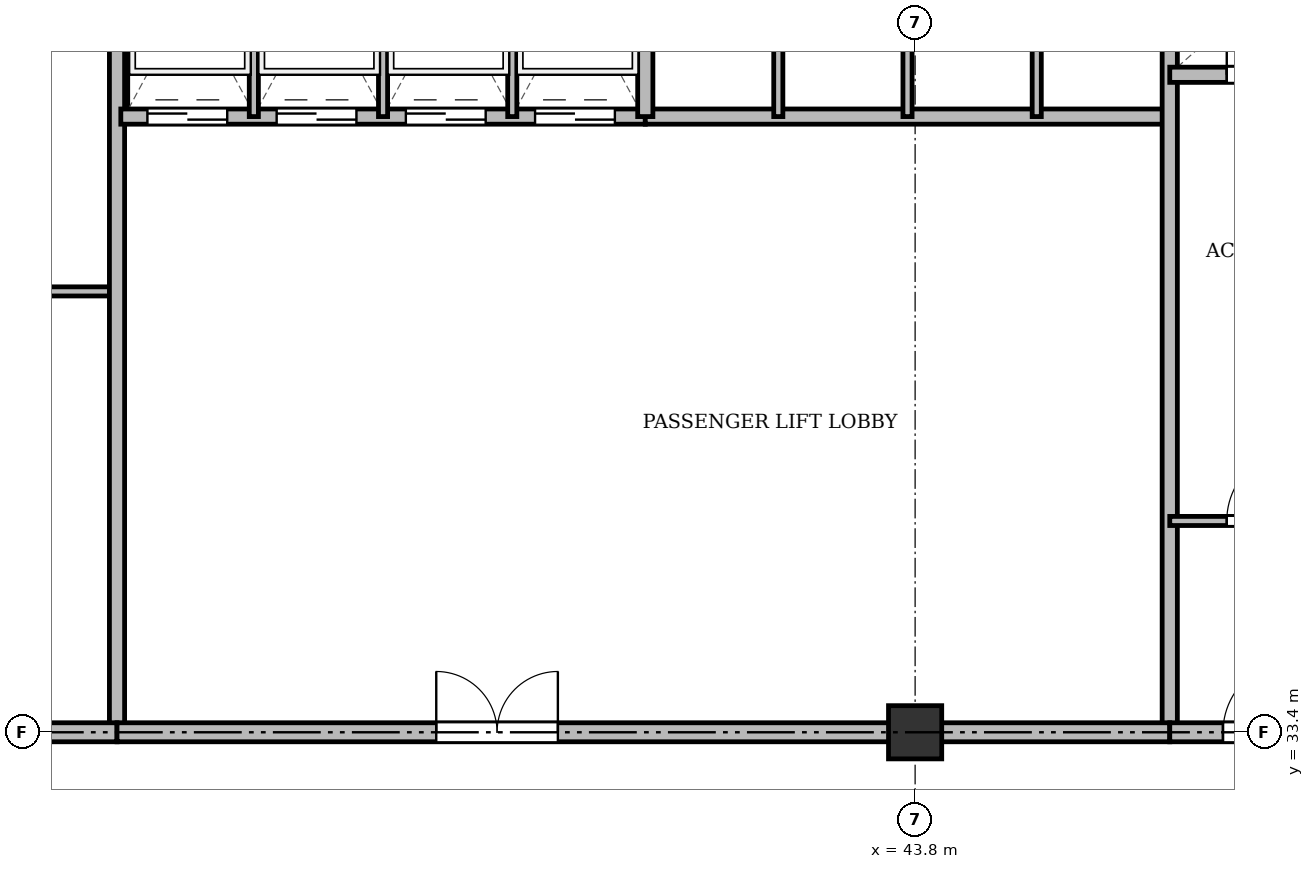
"""IFC4 building model, lengths in metres.
Left out: names, types, materials, properties, quantities, classifications, styles, units other than length and angle.
Written with IfcOpenShell. Run it as: python <this file> out.ifc"""

import sys

from ifc_helpers import new_model, si_unit, direction, frame, frame_2d, origin, origin_2d, place, context, subcontext, project, spatial, rectangle, extrude, source, transform, mapped, element, fill, save


model = new_model("IFC4")
c1 = context("Model", 3, precision=1e-05, world=origin(), true_north=direction((0.0, 1.0)))
c2 = subcontext(c1, "Body", "Model", "MODEL_VIEW")
j1 = project(units=[si_unit("LENGTHUNIT", "METRE"), si_unit("PLANEANGLEUNIT", "RADIAN")], contexts=[c1])
p1 = place(None, origin())
s1 = spatial("IfcSite", under=j1, at=p1, CompositionType="ELEMENT")
p2 = place(p1, origin())
s2 = spatial("IfcBuilding", under=s1, at=p2, CompositionType="ELEMENT")
p3 = place(p2, frame((0.0, 0.0, 204.9)))
s3 = spatial("IfcBuildingStorey", under=s2, at=p3, CompositionType="ELEMENT", Elevation=204.9)
m1 = source(origin(), c2, "Body", "SweptSolid", [
    extrude(rectangle(XDim=0.7, YDim=0.7, at=origin_2d()), origin(), (0.0, 0.0, 1.0), 3.6),
])
p4 = place(p3, frame((43.8, 33.4, 0.0), z_axis=(0.0, 0.0, 1.0), x_axis=(1.0, 0.0, 0.0)))
e1 = element("IfcColumn", 1, at=p4, inside=s3, PredefinedType="COLUMN", context=c2, shape_type="MappedRepresentation", body=[
    mapped(m1, transform((0.0, 0.0, 0.0), x_axis=(1.0, 0.0, 0.0), y_axis=(0.0, 1.0, 0.0), z_axis=(0.0, 0.0, 1.0), scale=1.0)),
])
p5 = place(p3, frame((26.3, 39.2, 0.0), z_axis=(0.0, 0.0, 1.0), x_axis=(1.0, 0.0, 0.0)))
e2 = element("IfcWall", 2, at=p5, inside=s3, PredefinedType="PARTITIONING", context=c2, shape_type="SweptSolid", body=[
    extrude(rectangle(XDim=7.0, YDim=0.12, at=frame_2d((3.5, 0.0))), origin(), (0.0, 0.0, 1.0), 2.86),
])
p6 = place(p5, frame((2.6, 0.0, 0.0)))
e3 = element("IfcOpeningElement", 3, at=p6, cuts=e2, PredefinedType="OPENING", context=c2, shape_type="SweptSolid", body=[
    extrude(rectangle(XDim=0.95, YDim=2.15, at=frame_2d((0.475, 1.075))), frame((0.0, 0.07, 0.0), z_axis=(0.0, -1.0, 0.0), x_axis=(1.0, 0.0, 0.0)), (0.0, 0.0, 1.0), 0.14),
])
p7 = place(p3, frame((33.3, 33.4, 0.0), z_axis=(0.0, 0.0, 1.0), x_axis=(0.0, 1.0, 0.0)))
e4 = element("IfcWall", 4, at=p7, inside=s3, PredefinedType="SOLIDWALL", context=c2, shape_type="SweptSolid", body=[
    extrude(rectangle(XDim=11.3, YDim=0.2, at=frame_2d((5.65, 0.0))), origin(), (0.0, 0.0, 1.0), 2.91),
])
p8 = place(p3, frame((33.35, 41.5, 0.0), z_axis=(0.0, 0.0, 1.0), x_axis=(1.0, 0.0, 0.0)))
e5 = element("IfcWall", 5, at=p8, inside=s3, PredefinedType="SOLIDWALL", context=c2, shape_type="SweptSolid", body=[
    extrude(rectangle(XDim=6.9, YDim=0.2, at=frame_2d((3.45, 0.0))), origin(), (0.0, 0.0, 1.0), 3.36),
])
p9 = place(p8, frame((0.35, 0.0, 0.0)))
e6 = element("IfcOpeningElement", 6, at=p9, cuts=e5, PredefinedType="OPENING", context=c2, shape_type="SweptSolid", body=[
    extrude(rectangle(XDim=1.05, YDim=2.15, at=frame_2d((0.525, 1.075))), frame((0.0, 0.11, 0.0), z_axis=(0.0, -1.0, 0.0), x_axis=(1.0, 0.0, 0.0)), (0.0, 0.0, 1.0), 0.22),
])
p10 = place(p8, frame((2.05, 0.0, 0.0)))
e7 = element("IfcOpeningElement", 7, at=p10, cuts=e5, PredefinedType="OPENING", context=c2, shape_type="SweptSolid", body=[
    extrude(rectangle(XDim=1.05, YDim=2.15, at=frame_2d((0.525, 1.075))), frame((0.0, 0.11, 0.0), z_axis=(0.0, -1.0, 0.0), x_axis=(1.0, 0.0, 0.0)), (0.0, 0.0, 1.0), 0.22),
])
p11 = place(p8, frame((3.75, 0.0, 0.0)))
e8 = element("IfcOpeningElement", 8, at=p11, cuts=e5, PredefinedType="OPENING", context=c2, shape_type="SweptSolid", body=[
    extrude(rectangle(XDim=1.05, YDim=2.15, at=frame_2d((0.525, 1.075))), frame((0.0, 0.11, 0.0), z_axis=(0.0, -1.0, 0.0), x_axis=(1.0, 0.0, 0.0)), (0.0, 0.0, 1.0), 0.22),
])
p12 = place(p8, frame((5.45, 0.0, 0.0)))
e9 = element("IfcOpeningElement", 9, at=p12, cuts=e5, PredefinedType="OPENING", context=c2, shape_type="SweptSolid", body=[
    extrude(rectangle(XDim=1.05, YDim=2.15, at=frame_2d((0.525, 1.075))), frame((0.0, 0.11, 0.0), z_axis=(0.0, -1.0, 0.0), x_axis=(1.0, 0.0, 0.0)), (0.0, 0.0, 1.0), 0.22),
])
for number, where, z_axis, x_axis in (
    (10, (35.1, 41.5, 0.0), (0.0, 0.0, 1.0), (0.0, 1.0, 0.0)),
    (11, (36.8, 41.5, 0.0), (0.0, 0.0, 1.0), (0.0, 1.0, 0.0)),
    (12, (38.5, 41.5, 0.0), (0.0, 0.0, 1.0), (0.0, 1.0, 0.0)),
):
    element("IfcWall", number, at=place(p3, frame(where, z_axis=z_axis, x_axis=x_axis)), inside=s3, PredefinedType="PARTITIONING", context=c2, shape_type="SweptSolid", body=[
        extrude(rectangle(XDim=3.2, YDim=0.12, at=frame_2d((1.6, 0.0))), origin(), (0.0, 0.0, 1.0), 3.36),
    ])
p13 = place(p3, frame((40.25, 41.5, 0.0), z_axis=(0.0, 0.0, 1.0), x_axis=(1.0, 0.0, 0.0)))
e13 = element("IfcWall", 13, at=p13, inside=s3, PredefinedType="SOLIDWALL", context=c2, shape_type="SweptSolid", body=[
    extrude(rectangle(XDim=6.9, YDim=0.2, at=frame_2d((3.45, 0.0))), origin(), (0.0, 0.0, 1.0), 2.86),
])
p14 = place(p3, frame((40.25, 41.5, 0.0), z_axis=(0.0, 0.0, 1.0), x_axis=(0.0, 1.0, 0.0)))
e14 = element("IfcWall", 14, at=p14, inside=s3, PredefinedType="SOLIDWALL", context=c2, shape_type="SweptSolid", body=[
    extrude(rectangle(XDim=3.2, YDim=0.2, at=frame_2d((1.6, 0.0))), origin(), (0.0, 0.0, 1.0), 3.36),
])
p15 = place(p3, frame((42.0, 41.5, 0.0), z_axis=(0.0, 0.0, 1.0), x_axis=(0.0, 1.0, 0.0)))
e15 = element("IfcWall", 15, at=p15, inside=s3, PredefinedType="PARTITIONING", context=c2, shape_type="SweptSolid", body=[
    extrude(rectangle(XDim=3.2, YDim=0.12, at=frame_2d((1.6, 0.0))), origin(), (0.0, 0.0, 1.0), 3.36),
])
p16 = place(p3, frame((43.7, 41.5, 0.0), z_axis=(0.0, 0.0, 1.0), x_axis=(0.0, 1.0, 0.0)))
e16 = element("IfcWall", 16, at=p16, inside=s3, PredefinedType="PARTITIONING", context=c2, shape_type="SweptSolid", body=[
    extrude(rectangle(XDim=3.2, YDim=0.12, at=frame_2d((1.6, 0.0))), origin(), (0.0, 0.0, 1.0), 2.86),
])
p17 = place(p3, frame((45.4, 41.5, 0.0), z_axis=(0.0, 0.0, 1.0), x_axis=(0.0, 1.0, 0.0)))
e17 = element("IfcWall", 17, at=p17, inside=s3, PredefinedType="PARTITIONING", context=c2, shape_type="SweptSolid", body=[
    extrude(rectangle(XDim=3.2, YDim=0.12, at=frame_2d((1.6, 0.0))), origin(), (0.0, 0.0, 1.0), 3.36),
])
p18 = place(p3, frame((47.15, 33.4, 0.0), z_axis=(0.0, 0.0, 1.0), x_axis=(0.0, 1.0, 0.0)))
e18 = element("IfcWall", 18, at=p18, inside=s3, PredefinedType="SOLIDWALL", context=c2, shape_type="SweptSolid", body=[
    extrude(rectangle(XDim=11.3, YDim=0.2, at=frame_2d((5.65, 0.0))), origin(), (0.0, 0.0, 1.0), 2.91),
])
p19 = place(p3, frame((26.3, 33.4, 0.0), z_axis=(0.0, 0.0, 1.0), x_axis=(1.0, 0.0, 0.0)))
e19 = element("IfcWall", 19, at=p19, inside=s3, PredefinedType="PARTITIONING", context=c2, shape_type="SweptSolid", body=[
    extrude(rectangle(XDim=7.0, YDim=0.25, at=frame_2d((3.5, 0.0))), origin(), (0.0, 0.0, 1.0), 2.91),
])
p20 = place(p19, frame((1.35, 0.0, 0.0)))
e20 = element("IfcOpeningElement", 20, at=p20, cuts=e19, PredefinedType="OPENING", context=c2, shape_type="SweptSolid", body=[
    extrude(rectangle(XDim=0.95, YDim=2.15, at=frame_2d((0.475, 1.075))), frame((0.0, 0.135, 0.0), z_axis=(0.0, -1.0, 0.0), x_axis=(1.0, 0.0, 0.0)), (0.0, 0.0, 1.0), 0.27),
])
p21 = place(p3, frame((33.3, 33.4, 0.0), z_axis=(0.0, 0.0, 1.0), x_axis=(1.0, 0.0, 0.0)))
e21 = element("IfcWall", 21, at=p21, inside=s3, PredefinedType="PARTITIONING", context=c2, shape_type="SweptSolid", body=[
    extrude(rectangle(XDim=13.85, YDim=0.25, at=frame_2d((6.925, 0.0))), origin(), (0.0, 0.0, 1.0), 2.91),
])
p22 = place(p21, frame((4.2, 0.0, 0.0)))
e22 = element("IfcOpeningElement", 22, at=p22, cuts=e21, PredefinedType="OPENING", context=c2, shape_type="SweptSolid", body=[
    extrude(rectangle(XDim=1.6, YDim=2.2, at=frame_2d((0.8, 1.1))), frame((0.0, 0.135, 0.0), z_axis=(0.0, -1.0, 0.0), x_axis=(1.0, 0.0, 0.0)), (0.0, 0.0, 1.0), 0.27),
])
p23 = place(p3, frame((47.15, 42.05, 0.0), z_axis=(0.0, 0.0, 1.0), x_axis=(1.0, 0.0, 0.0)))
e23 = element("IfcWall", 23, at=p23, inside=s3, PredefinedType="SOLIDWALL", context=c2, shape_type="SweptSolid", body=[
    extrude(rectangle(XDim=7.85, YDim=0.2, at=frame_2d((3.925, 0.0))), origin(), (0.0, 0.0, 1.0), 2.86),
])
p24 = place(p23, frame((0.75, 0.0, 0.0)))
e24 = element("IfcOpeningElement", 24, at=p24, cuts=e23, PredefinedType="OPENING", context=c2, shape_type="SweptSolid", body=[
    extrude(rectangle(XDim=0.9, YDim=2.1, at=frame_2d((0.45, 1.05))), frame((0.0, 0.11, 0.0), z_axis=(0.0, -1.0, 0.0), x_axis=(1.0, 0.0, 0.0)), (0.0, 0.0, 1.0), 0.22),
])
p25 = place(p23, frame((3.85, 0.0, 0.0)))
e25 = element("IfcOpeningElement", 25, at=p25, cuts=e23, PredefinedType="OPENING", context=c2, shape_type="SweptSolid", body=[
    extrude(rectangle(XDim=0.9, YDim=2.1, at=frame_2d((0.45, 1.05))), frame((0.0, 0.11, 0.0), z_axis=(0.0, -1.0, 0.0), x_axis=(1.0, 0.0, 0.0)), (0.0, 0.0, 1.0), 0.22),
])
p26 = place(p3, frame((47.15, 36.18, 0.0), z_axis=(0.0, 0.0, 1.0), x_axis=(1.0, 0.0, 0.0)))
e26 = element("IfcWall", 26, at=p26, inside=s3, PredefinedType="PARTITIONING", context=c2, shape_type="SweptSolid", body=[
    extrude(rectangle(XDim=5.3, YDim=0.12, at=frame_2d((2.65, 0.0))), origin(), (0.0, 0.0, 1.0), 2.86),
])
p27 = place(p26, frame((0.75, 0.0, 0.0)))
e27 = element("IfcOpeningElement", 27, at=p27, cuts=e26, PredefinedType="OPENING", context=c2, shape_type="SweptSolid", body=[
    extrude(rectangle(XDim=0.95, YDim=2.15, at=frame_2d((0.475, 1.075))), frame((0.0, 0.07, 0.0), z_axis=(0.0, -1.0, 0.0), x_axis=(1.0, 0.0, 0.0)), (0.0, 0.0, 1.0), 0.14),
])
p28 = place(p26, frame((3.45, 0.0, 0.0)))
e28 = element("IfcOpeningElement", 28, at=p28, cuts=e26, PredefinedType="OPENING", context=c2, shape_type="SweptSolid", body=[
    extrude(rectangle(XDim=0.95, YDim=2.15, at=frame_2d((0.475, 1.075))), frame((0.0, 0.07, 0.0), z_axis=(0.0, -1.0, 0.0), x_axis=(1.0, 0.0, 0.0)), (0.0, 0.0, 1.0), 0.14),
])
p29 = place(p3, frame((47.15, 33.4, 0.0), z_axis=(0.0, 0.0, 1.0), x_axis=(1.0, 0.0, 0.0)))
e29 = element("IfcWall", 29, at=p29, inside=s3, PredefinedType="PARTITIONING", context=c2, shape_type="SweptSolid", body=[
    extrude(rectangle(XDim=11.15, YDim=0.25, at=frame_2d((5.575, 0.0))), origin(), (0.0, 0.0, 1.0), 2.91),
])
p30 = place(p29, frame((0.7, 0.0, 0.0)))
e30 = element("IfcOpeningElement", 30, at=p30, cuts=e29, PredefinedType="OPENING", context=c2, shape_type="SweptSolid", body=[
    extrude(rectangle(XDim=0.95, YDim=2.15, at=frame_2d((0.475, 1.075))), frame((0.0, 0.135, 0.0), z_axis=(0.0, -1.0, 0.0), x_axis=(1.0, 0.0, 0.0)), (0.0, 0.0, 1.0), 0.27),
])
p31 = place(p29, frame((6.0, 0.0, 0.0)))
e31 = element("IfcOpeningElement", 31, at=p31, cuts=e29, PredefinedType="OPENING", context=c2, shape_type="SweptSolid", body=[
    extrude(rectangle(XDim=1.2, YDim=2.15, at=frame_2d((0.6, 1.075))), frame((0.0, 0.135, 0.0), z_axis=(0.0, -1.0, 0.0), x_axis=(1.0, 0.0, 0.0)), (0.0, 0.0, 1.0), 0.27),
])
m2 = source(origin(), c2, "Body", "SweptSolid", [
    extrude(rectangle(XDim=1.05, YDim=2.15, at=frame_2d((0.525, 1.075))), frame((0.0, 0.025, 0.0), z_axis=(0.0, -1.0, 0.0), x_axis=(1.0, 0.0, 0.0)), (0.0, 0.0, 1.0), 0.05),
])
p32 = place(p9, origin())
e32 = element("IfcDoor", 32, at=p32, inside=s3, OperationType="DOUBLE_DOOR_SLIDING", PredefinedType="DOOR", context=c2, shape_type="MappedRepresentation", body=[
    mapped(m2, transform((0.0, 0.0, 0.0), x_axis=(1.0, 0.0, 0.0), y_axis=(0.0, 1.0, 0.0), z_axis=(0.0, 0.0, 1.0), scale=1.0)),
])
fill(e6, e32)
p33 = place(p10, origin())
e33 = element("IfcDoor", 33, at=p33, inside=s3, OperationType="DOUBLE_DOOR_SLIDING", PredefinedType="DOOR", context=c2, shape_type="MappedRepresentation", body=[
    mapped(m2, transform((0.0, 0.0, 0.0), x_axis=(1.0, 0.0, 0.0), y_axis=(0.0, 1.0, 0.0), z_axis=(0.0, 0.0, 1.0), scale=1.0)),
])
fill(e7, e33)
p34 = place(p11, origin())
e34 = element("IfcDoor", 34, at=p34, inside=s3, OperationType="DOUBLE_DOOR_SLIDING", PredefinedType="DOOR", context=c2, shape_type="MappedRepresentation", body=[
    mapped(m2, transform((0.0, 0.0, 0.0), x_axis=(1.0, 0.0, 0.0), y_axis=(0.0, 1.0, 0.0), z_axis=(0.0, 0.0, 1.0), scale=1.0)),
])
fill(e8, e34)
p35 = place(p12, origin())
e35 = element("IfcDoor", 35, at=p35, inside=s3, OperationType="DOUBLE_DOOR_SLIDING", PredefinedType="DOOR", context=c2, shape_type="MappedRepresentation", body=[
    mapped(m2, transform((0.0, 0.0, 0.0), x_axis=(1.0, 0.0, 0.0), y_axis=(0.0, 1.0, 0.0), z_axis=(0.0, 0.0, 1.0), scale=1.0)),
])
fill(e9, e35)
m3 = source(origin(), c2, "Body", "SweptSolid", [
    extrude(rectangle(XDim=1.6, YDim=2.2, at=frame_2d((0.8, 1.1))), frame((0.0, 0.025, 0.0), z_axis=(0.0, -1.0, 0.0), x_axis=(1.0, 0.0, 0.0)), (0.0, 0.0, 1.0), 0.05),
])
p36 = place(p22, origin())
e36 = element("IfcDoor", 36, at=p36, inside=s3, OperationType="DOUBLE_DOOR_SINGLE_SWING", PredefinedType="DOOR", context=c2, shape_type="MappedRepresentation", body=[
    mapped(m3, transform((0.0, 0.0, 0.0), x_axis=(1.0, 0.0, 0.0), y_axis=(0.0, 1.0, 0.0), z_axis=(0.0, 0.0, 1.0), scale=1.0)),
])
fill(e22, e36)
m4 = source(origin(), c2, "Body", "SweptSolid", [
    extrude(rectangle(XDim=0.9, YDim=2.1, at=frame_2d((0.45, 1.05))), frame((0.0, 0.025, 0.0), z_axis=(0.0, -1.0, 0.0), x_axis=(1.0, 0.0, 0.0)), (0.0, 0.0, 1.0), 0.05),
])
p37 = place(p24, origin())
e37 = element("IfcDoor", 37, at=p37, inside=s3, OperationType="SINGLE_SWING_LEFT", PredefinedType="DOOR", context=c2, shape_type="MappedRepresentation", body=[
    mapped(m4, transform((0.0, 0.0, 0.0), x_axis=(1.0, 0.0, 0.0), y_axis=(0.0, 1.0, 0.0), z_axis=(0.0, 0.0, 1.0), scale=1.0)),
])
fill(e24, e37)
m5 = source(origin(), c2, "Body", "SweptSolid", [
    extrude(rectangle(XDim=0.95, YDim=2.15, at=frame_2d((0.475, 1.075))), frame((0.0, 0.025, 0.0), z_axis=(0.0, -1.0, 0.0), x_axis=(1.0, 0.0, 0.0)), (0.0, 0.0, 1.0), 0.05),
])
p38 = place(p27, origin())
e38 = element("IfcDoor", 38, at=p38, inside=s3, OperationType="SINGLE_SWING_RIGHT", PredefinedType="DOOR", context=c2, shape_type="MappedRepresentation", body=[
    mapped(m5, transform((0.0, 0.0, 0.0), x_axis=(1.0, 0.0, 0.0), y_axis=(0.0, 1.0, 0.0), z_axis=(0.0, 0.0, 1.0), scale=1.0)),
])
fill(e27, e38)
p39 = place(p30, origin())
e39 = element("IfcDoor", 39, at=p39, inside=s3, OperationType="SINGLE_SWING_RIGHT", PredefinedType="DOOR", context=c2, shape_type="MappedRepresentation", body=[
    mapped(m5, transform((0.0, 0.0, 0.0), x_axis=(1.0, 0.0, 0.0), y_axis=(0.0, 1.0, 0.0), z_axis=(0.0, 0.0, 1.0), scale=1.0)),
])
fill(e30, e39)
save(model, sys.argv[1])
